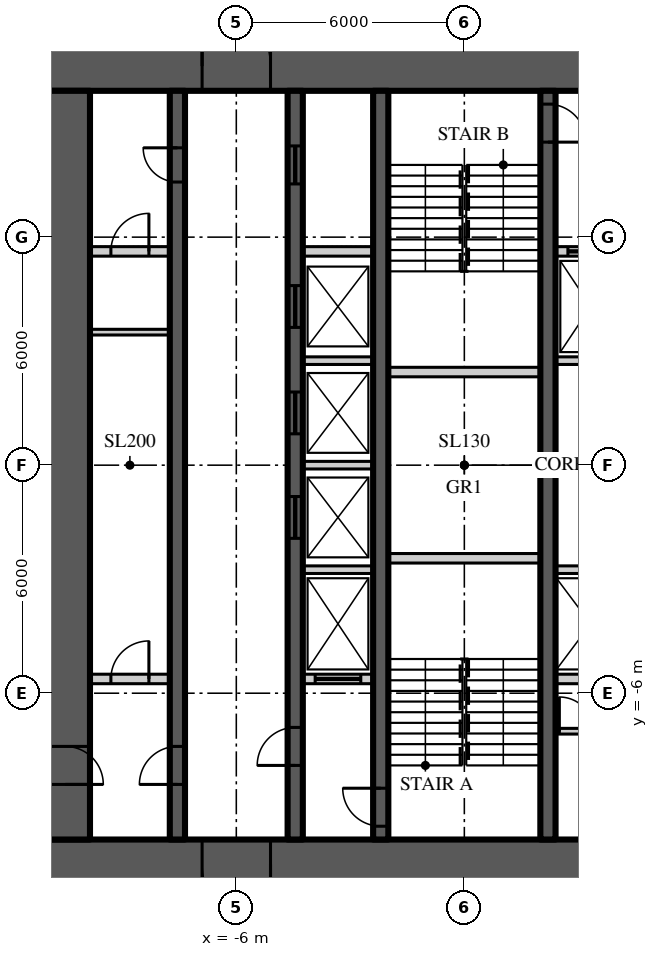
"""IFC4 building model, lengths in metres.
Left out: names, types, materials, properties, quantities, classifications, styles, units other than length and angle.
Written with IfcOpenShell. Run it as: python <this file> out.ifc"""

import sys

from ifc_helpers import new_model, si_unit, direction, frame, frame_2d, origin, place, context, subcontext, project, spatial, rectangle, extrude, element, fill, save


model = new_model("IFC4")
c1 = context("Model", 3, precision=1e-05, world=origin(), true_north=direction((0.0, 1.0)))
c2 = subcontext(c1, "Body", "Model", "MODEL_VIEW")
j1 = project(units=[si_unit("LENGTHUNIT", "METRE"), si_unit("PLANEANGLEUNIT", "RADIAN")], contexts=[c1])
p1 = place(None, origin())
s1 = spatial("IfcSite", under=j1, at=p1, CompositionType="ELEMENT")
p2 = place(p1, origin())
s2 = spatial("IfcBuilding", under=s1, at=p2, CompositionType="ELEMENT")
p3 = place(p2, frame((0.0, 0.0, 174.9)))
s3 = spatial("IfcBuildingStorey", under=s2, at=p3, CompositionType="ELEMENT", Elevation=174.9)
p4 = place(p3, frame((-11.15, 10.5, 0.0), z_axis=(0.0, 0.0, 1.0), x_axis=(1.0, 0.0, 0.0)))
e1 = element("IfcWall", 1, at=p4, inside=s3, PredefinedType="SHEAR", context=c2, shape_type="SweptSolid", body=[
    extrude(rectangle(XDim=22.3, YDim=1.3, at=frame_2d((11.15, 0.0))), origin(), (0.0, 0.0, 1.0), 3.9),
])
p5 = place(p4, frame((4.25, 0.0, 0.0)))
e2 = element("IfcOpeningElement", 2, at=p5, cuts=e1, PredefinedType="OPENING", context=c2, shape_type="SweptSolid", body=[
    extrude(rectangle(XDim=1.8, YDim=2.2, at=frame_2d((0.9, 1.1))), frame((0.0, 0.66, 0.0), z_axis=(0.0, -1.0, 0.0), x_axis=(1.0, 0.0, 0.0)), (0.0, 0.0, 1.0), 1.32),
])
p6 = place(p4, frame((16.25, 0.0, 0.0)))
e3 = element("IfcOpeningElement", 3, at=p6, cuts=e1, PredefinedType="OPENING", context=c2, shape_type="SweptSolid", body=[
    extrude(rectangle(XDim=1.8, YDim=2.2, at=frame_2d((0.9, 1.1))), frame((0.0, 0.66, 0.0), z_axis=(0.0, -1.0, 0.0), x_axis=(1.0, 0.0, 0.0)), (0.0, 0.0, 1.0), 1.32),
])
p7 = place(p3, frame((11.15, -10.5, 0.0), z_axis=(0.0, 0.0, 1.0), x_axis=(-1.0, 0.0, 0.0)))
e4 = element("IfcWall", 4, at=p7, inside=s3, PredefinedType="SHEAR", context=c2, shape_type="SweptSolid", body=[
    extrude(rectangle(XDim=22.3, YDim=1.3, at=frame_2d((11.15, 0.0))), origin(), (0.0, 0.0, 1.0), 3.9),
])
p8 = place(p7, frame((16.25, 0.0, 0.0)))
e5 = element("IfcOpeningElement", 5, at=p8, cuts=e4, PredefinedType="OPENING", context=c2, shape_type="SweptSolid", body=[
    extrude(rectangle(XDim=1.8, YDim=2.2, at=frame_2d((0.9, 1.1))), frame((0.0, 0.66, 0.0), z_axis=(0.0, -1.0, 0.0), x_axis=(1.0, 0.0, 0.0)), (0.0, 0.0, 1.0), 1.32),
])
p9 = place(p7, frame((4.25, 0.0, 0.0)))
e6 = element("IfcOpeningElement", 6, at=p9, cuts=e4, PredefinedType="OPENING", context=c2, shape_type="SweptSolid", body=[
    extrude(rectangle(XDim=1.8, YDim=2.2, at=frame_2d((0.9, 1.1))), frame((0.0, 0.66, 0.0), z_axis=(0.0, -1.0, 0.0), x_axis=(1.0, 0.0, 0.0)), (0.0, 0.0, 1.0), 1.32),
])
p10 = place(p3, frame((-10.5, 9.85, 0.0), z_axis=(0.0, 0.0, 1.0), x_axis=(0.0, -1.0, 0.0)))
e7 = element("IfcWall", 7, at=p10, inside=s3, PredefinedType="SHEAR", context=c2, shape_type="SweptSolid", body=[
    extrude(rectangle(XDim=19.7, YDim=1.3, at=frame_2d((9.85, 0.0))), origin(), (0.0, 0.0, 1.0), 3.9),
])
p11 = place(p10, frame((17.25, 0.0, 0.0)))
e8 = element("IfcOpeningElement", 8, at=p11, cuts=e7, PredefinedType="OPENING", context=c2, shape_type="SweptSolid", body=[
    extrude(rectangle(XDim=1.0, YDim=2.2, at=frame_2d((0.5, 1.1))), frame((0.0, 0.66, 0.0), z_axis=(0.0, -1.0, 0.0), x_axis=(1.0, 0.0, 0.0)), (0.0, 0.0, 1.0), 1.32),
])
p12 = place(p3, frame((-7.55, -9.85, 0.0), z_axis=(0.0, 0.0, 1.0), x_axis=(0.0, 1.0, 0.0)))
e9 = element("IfcWall", 9, at=p12, inside=s3, PredefinedType="SHEAR", context=c2, shape_type="SweptSolid", body=[
    extrude(rectangle(XDim=19.7, YDim=0.4, at=frame_2d((9.85, 0.0))), origin(), (0.0, 0.0, 1.0), 3.9),
])
p13 = place(p12, frame((1.45, 0.0, 0.0)))
e10 = element("IfcOpeningElement", 10, at=p13, cuts=e9, PredefinedType="OPENING", context=c2, shape_type="SweptSolid", body=[
    extrude(rectangle(XDim=1.0, YDim=2.2, at=frame_2d((0.5, 1.1))), frame((0.0, 0.21, 0.0), z_axis=(0.0, -1.0, 0.0), x_axis=(1.0, 0.0, 0.0)), (0.0, 0.0, 1.0), 0.42),
])
p14 = place(p12, frame((17.3, 0.0, 0.0)))
e11 = element("IfcOpeningElement", 11, at=p14, cuts=e9, PredefinedType="OPENING", context=c2, shape_type="SweptSolid", body=[
    extrude(rectangle(XDim=0.9, YDim=2.1, at=frame_2d((0.45, 1.05))), frame((0.0, 0.21, 0.0), z_axis=(0.0, -1.0, 0.0), x_axis=(1.0, 0.0, 0.0)), (0.0, 0.0, 1.0), 0.42),
])
p15 = place(p3, frame((-4.45, -9.85, 0.0), z_axis=(0.0, 0.0, 1.0), x_axis=(0.0, 1.0, 0.0)))
e12 = element("IfcWall", 12, at=p15, inside=s3, PredefinedType="SHEAR", context=c2, shape_type="SweptSolid", body=[
    extrude(rectangle(XDim=19.7, YDim=0.4, at=frame_2d((9.85, 0.0))), origin(), (0.0, 0.0, 1.0), 3.9),
])
p16 = place(p15, frame((1.95, 0.0, 0.0)))
e13 = element("IfcOpeningElement", 13, at=p16, cuts=e12, PredefinedType="OPENING", context=c2, shape_type="SweptSolid", body=[
    extrude(rectangle(XDim=1.0, YDim=2.2, at=frame_2d((0.5, 1.1))), frame((0.0, 0.21, 0.0), z_axis=(0.0, -1.0, 0.0), x_axis=(1.0, 0.0, 0.0)), (0.0, 0.0, 1.0), 0.42),
])
p17 = place(p15, frame((17.25, 0.0, 0.0)))
e14 = element("IfcOpeningElement", 14, at=p17, cuts=e12, PredefinedType="OPENING", context=c2, shape_type="SweptSolid", body=[
    extrude(rectangle(XDim=1.0, YDim=2.1, at=frame_2d((0.5, 1.05))), frame((0.0, 0.21, 0.0), z_axis=(0.0, -1.0, 0.0), x_axis=(1.0, 0.0, 0.0)), (0.0, 0.0, 1.0), 0.42),
])
p18 = place(p15, frame((7.925, 0.0, 0.0)))
e15 = element("IfcOpeningElement", 15, at=p18, cuts=e12, PredefinedType="OPENING", context=c2, shape_type="SweptSolid", body=[
    extrude(rectangle(XDim=1.1, YDim=2.2, at=frame_2d((0.55, 1.1))), frame((0.0, 0.21, 0.0), z_axis=(0.0, -1.0, 0.0), x_axis=(1.0, 0.0, 0.0)), (0.0, 0.0, 1.0), 0.42),
])
p19 = place(p15, frame((10.675, 0.0, 0.0)))
e16 = element("IfcOpeningElement", 16, at=p19, cuts=e12, PredefinedType="OPENING", context=c2, shape_type="SweptSolid", body=[
    extrude(rectangle(XDim=1.1, YDim=2.2, at=frame_2d((0.55, 1.1))), frame((0.0, 0.21, 0.0), z_axis=(0.0, -1.0, 0.0), x_axis=(1.0, 0.0, 0.0)), (0.0, 0.0, 1.0), 0.42),
])
p20 = place(p15, frame((13.475, 0.0, 0.0)))
e17 = element("IfcOpeningElement", 17, at=p20, cuts=e12, PredefinedType="OPENING", context=c2, shape_type="SweptSolid", body=[
    extrude(rectangle(XDim=1.1, YDim=2.2, at=frame_2d((0.55, 1.1))), frame((0.0, 0.21, 0.0), z_axis=(0.0, -1.0, 0.0), x_axis=(1.0, 0.0, 0.0)), (0.0, 0.0, 1.0), 0.42),
])
p21 = place(p3, frame((-2.2, -9.85, 0.0), z_axis=(0.0, 0.0, 1.0), x_axis=(0.0, 1.0, 0.0)))
e18 = element("IfcWall", 18, at=p21, inside=s3, PredefinedType="SHEAR", context=c2, shape_type="SweptSolid", body=[
    extrude(rectangle(XDim=19.7, YDim=0.4, at=frame_2d((9.85, 0.0))), origin(), (0.0, 0.0, 1.0), 3.9),
])
p22 = place(p21, frame((0.35, 0.0, 0.0)))
e19 = element("IfcOpeningElement", 19, at=p22, cuts=e18, PredefinedType="OPENING", context=c2, shape_type="SweptSolid", body=[
    extrude(rectangle(XDim=1.0, YDim=2.2, at=frame_2d((0.5, 1.1))), frame((0.0, 0.21, 0.0), z_axis=(0.0, -1.0, 0.0), x_axis=(1.0, 0.0, 0.0)), (0.0, 0.0, 1.0), 0.42),
])
p23 = place(p3, frame((2.2, 9.85, 0.0), z_axis=(0.0, 0.0, 1.0), x_axis=(0.0, -1.0, 0.0)))
e20 = element("IfcWall", 20, at=p23, inside=s3, PredefinedType="SHEAR", context=c2, shape_type="SweptSolid", body=[
    extrude(rectangle(XDim=19.7, YDim=0.4, at=frame_2d((9.85, 0.0))), origin(), (0.0, 0.0, 1.0), 3.9),
])
p24 = place(p23, frame((0.35, 0.0, 0.0)))
e21 = element("IfcOpeningElement", 21, at=p24, cuts=e20, PredefinedType="OPENING", context=c2, shape_type="SweptSolid", body=[
    extrude(rectangle(XDim=1.0, YDim=2.2, at=frame_2d((0.5, 1.1))), frame((0.0, 0.21, 0.0), z_axis=(0.0, -1.0, 0.0), x_axis=(1.0, 0.0, 0.0)), (0.0, 0.0, 1.0), 0.42),
])
p25 = place(p3, frame((-9.85, 5.625, 0.0), z_axis=(0.0, 0.0, 1.0), x_axis=(1.0, 0.0, 0.0)))
e22 = element("IfcWall", 22, at=p25, inside=s3, PredefinedType="SOLIDWALL", context=c2, shape_type="SweptSolid", body=[
    extrude(rectangle(XDim=2.1, YDim=0.25, at=frame_2d((1.05, 0.0))), origin(), (0.0, 0.0, 1.0), 3.7),
])
p26 = place(p25, frame((0.55, 0.0, 0.0)))
e23 = element("IfcOpeningElement", 23, at=p26, cuts=e22, PredefinedType="OPENING", context=c2, shape_type="SweptSolid", body=[
    extrude(rectangle(XDim=1.0, YDim=2.2, at=frame_2d((0.5, 1.1))), frame((0.0, 0.135, 0.0), z_axis=(0.0, -1.0, 0.0), x_axis=(1.0, 0.0, 0.0)), (0.0, 0.0, 1.0), 0.27),
])
p27 = place(p3, frame((-4.25, 5.625, 0.0), z_axis=(0.0, 0.0, 1.0), x_axis=(1.0, 0.0, 0.0)))
e24 = element("IfcWall", 24, at=p27, inside=s3, PredefinedType="SOLIDWALL", context=c2, shape_type="SweptSolid", body=[
    extrude(rectangle(XDim=1.85, YDim=0.25, at=frame_2d((0.925, 0.0))), origin(), (0.0, 0.0, 1.0), 3.7),
])
p28 = place(p3, frame((2.4, 5.625, 0.0), z_axis=(0.0, 0.0, 1.0), x_axis=(1.0, 0.0, 0.0)))
e25 = element("IfcWall", 25, at=p28, inside=s3, PredefinedType="SOLIDWALL", context=c2, shape_type="SweptSolid", body=[
    extrude(rectangle(XDim=1.85, YDim=0.25, at=frame_2d((0.925, 0.0))), origin(), (0.0, 0.0, 1.0), 3.7),
])
p29 = place(p28, frame((0.325, 0.0, 0.0)))
e26 = element("IfcOpeningElement", 26, at=p29, cuts=e25, PredefinedType="OPENING", context=c2, shape_type="SweptSolid", body=[
    extrude(rectangle(XDim=1.2, YDim=2.2, at=frame_2d((0.6, 1.1))), frame((0.0, 0.135, 0.0), z_axis=(0.0, -1.0, 0.0), x_axis=(1.0, 0.0, 0.0)), (0.0, 0.0, 1.0), 0.27),
])
p30 = place(p3, frame((-9.85, -5.625, 0.0), z_axis=(0.0, 0.0, 1.0), x_axis=(1.0, 0.0, 0.0)))
e27 = element("IfcWall", 27, at=p30, inside=s3, PredefinedType="SOLIDWALL", context=c2, shape_type="SweptSolid", body=[
    extrude(rectangle(XDim=2.1, YDim=0.25, at=frame_2d((1.05, 0.0))), origin(), (0.0, 0.0, 1.0), 3.7),
])
p31 = place(p30, frame((0.55, 0.0, 0.0)))
e28 = element("IfcOpeningElement", 28, at=p31, cuts=e27, PredefinedType="OPENING", context=c2, shape_type="SweptSolid", body=[
    extrude(rectangle(XDim=1.0, YDim=2.2, at=frame_2d((0.5, 1.1))), frame((0.0, 0.135, 0.0), z_axis=(0.0, -1.0, 0.0), x_axis=(1.0, 0.0, 0.0)), (0.0, 0.0, 1.0), 0.27),
])
p32 = place(p3, frame((-4.25, -5.625, 0.0), z_axis=(0.0, 0.0, 1.0), x_axis=(1.0, 0.0, 0.0)))
e29 = element("IfcWall", 29, at=p32, inside=s3, PredefinedType="SOLIDWALL", context=c2, shape_type="SweptSolid", body=[
    extrude(rectangle(XDim=1.85, YDim=0.25, at=frame_2d((0.925, 0.0))), origin(), (0.0, 0.0, 1.0), 3.7),
])
p33 = place(p32, frame((0.325, 0.0, 0.0)))
e30 = element("IfcOpeningElement", 30, at=p33, cuts=e29, PredefinedType="OPENING", context=c2, shape_type="SweptSolid", body=[
    extrude(rectangle(XDim=1.2, YDim=2.2, at=frame_2d((0.6, 1.1))), frame((0.0, 0.135, 0.0), z_axis=(0.0, -1.0, 0.0), x_axis=(1.0, 0.0, 0.0)), (0.0, 0.0, 1.0), 0.27),
])
p34 = place(p3, frame((2.4, -5.625, 0.0), z_axis=(0.0, 0.0, 1.0), x_axis=(1.0, 0.0, 0.0)))
e31 = element("IfcWall", 31, at=p34, inside=s3, PredefinedType="SOLIDWALL", context=c2, shape_type="SweptSolid", body=[
    extrude(rectangle(XDim=1.85, YDim=0.25, at=frame_2d((0.925, 0.0))), origin(), (0.0, 0.0, 1.0), 3.7),
])
for number, where, z_axis, x_axis in (
    (32, (-2.0, -2.45, 0.0), (0.0, 0.0, 1.0), (1.0, 0.0, 0.0)),
    (33, (-2.0, 2.45, 0.0), (0.0, 0.0, 1.0), (1.0, 0.0, 0.0)),
):
    element("IfcWall", number, at=place(p3, frame(where, z_axis=z_axis, x_axis=x_axis)), inside=s3, PredefinedType="SOLIDWALL", context=c2, shape_type="SweptSolid", body=[
        extrude(rectangle(XDim=4.0, YDim=0.25, at=frame_2d((2.0, 0.0))), origin(), (0.0, 0.0, 1.0), 3.7),
    ])
for number, where, z_axis, x_axis in (
    (34, (-4.25, -2.75, 0.0), (0.0, 0.0, 1.0), (1.0, 0.0, 0.0)),
    (35, (2.4, -2.75, 0.0), (0.0, 0.0, 1.0), (1.0, 0.0, 0.0)),
    (36, (-4.25, 0.0, 0.0), (0.0, 0.0, 1.0), (1.0, 0.0, 0.0)),
    (37, (-4.25, 2.75, 0.0), (0.0, 0.0, 1.0), (1.0, 0.0, 0.0)),
    (38, (2.4, 2.75, 0.0), (0.0, 0.0, 1.0), (1.0, 0.0, 0.0)),
):
    element("IfcWall", number, at=place(p3, frame(where, z_axis=z_axis, x_axis=x_axis)), inside=s3, PredefinedType="SOLIDWALL", context=c2, shape_type="SweptSolid", body=[
        extrude(rectangle(XDim=1.85, YDim=0.2, at=frame_2d((0.925, 0.0))), origin(), (0.0, 0.0, 1.0), 3.7),
    ])
p35 = place(p3, frame((-9.85, 3.5, 0.0), z_axis=(0.0, 0.0, 1.0), x_axis=(1.0, 0.0, 0.0)))
e39 = element("IfcWall", 39, at=p35, inside=s3, PredefinedType="SOLIDWALL", context=c2, shape_type="SweptSolid", body=[
    extrude(rectangle(XDim=2.1, YDim=0.15, at=frame_2d((1.05, 0.0))), origin(), (0.0, 0.0, 1.0), 3.77),
])
p36 = place(p3, frame((2.4, -7.0, 0.0), z_axis=(0.0, 0.0, 1.0), x_axis=(1.0, 0.0, 0.0)))
e40 = element("IfcWall", 40, at=p36, inside=s3, PredefinedType="SOLIDWALL", context=c2, shape_type="SweptSolid", body=[
    extrude(rectangle(XDim=1.85, YDim=0.15, at=frame_2d((0.925, 0.0))), origin(), (0.0, 0.0, 1.0), 3.77),
])
p37 = place(p36, frame((0.1, 0.0, 0.0)))
e41 = element("IfcOpeningElement", 41, at=p37, cuts=e40, PredefinedType="OPENING", context=c2, shape_type="SweptSolid", body=[
    extrude(rectangle(XDim=0.9, YDim=2.1, at=frame_2d((0.45, 1.05))), frame((0.0, 0.085, 0.0), z_axis=(0.0, -1.0, 0.0), x_axis=(1.0, 0.0, 0.0)), (0.0, 0.0, 1.0), 0.17),
])
p38 = place(p5, origin())
e42 = element("IfcDoor", 42, at=p38, inside=s3, OperationType="DOUBLE_DOOR_DOUBLE_SWING", PredefinedType="DOOR", context=c2, shape_type="SweptSolid", body=[
    extrude(rectangle(XDim=1.8, YDim=2.2, at=frame_2d((0.9, 1.1))), frame((0.0, 0.025, 0.0), z_axis=(0.0, -1.0, 0.0), x_axis=(1.0, 0.0, 0.0)), (0.0, 0.0, 1.0), 0.05),
])
fill(e2, e42)
p39 = place(p8, origin())
e43 = element("IfcDoor", 43, at=p39, inside=s3, OperationType="DOUBLE_DOOR_DOUBLE_SWING", PredefinedType="DOOR", context=c2, shape_type="SweptSolid", body=[
    extrude(rectangle(XDim=1.8, YDim=2.2, at=frame_2d((0.9, 1.1))), frame((0.0, 0.025, 0.0), z_axis=(0.0, -1.0, 0.0), x_axis=(1.0, 0.0, 0.0)), (0.0, 0.0, 1.0), 0.05),
])
fill(e5, e43)
p40 = place(p13, origin())
e44 = element("IfcDoor", 44, at=p40, inside=s3, OperationType="SINGLE_SWING_LEFT", PredefinedType="DOOR", context=c2, shape_type="SweptSolid", body=[
    extrude(rectangle(XDim=1.0, YDim=2.2, at=frame_2d((0.5, 1.1))), frame((0.0, 0.025, 0.0), z_axis=(0.0, -1.0, 0.0), x_axis=(1.0, 0.0, 0.0)), (0.0, 0.0, 1.0), 0.05),
])
fill(e10, e44)
p41 = place(p11, origin())
e45 = element("IfcDoor", 45, at=p41, inside=s3, OperationType="SINGLE_SWING_RIGHT", PredefinedType="DOOR", context=c2, shape_type="SweptSolid", body=[
    extrude(rectangle(XDim=1.0, YDim=2.2, at=frame_2d((0.5, 1.1))), frame((0.0, 0.025, 0.0), z_axis=(0.0, -1.0, 0.0), x_axis=(1.0, 0.0, 0.0)), (0.0, 0.0, 1.0), 0.05),
])
fill(e8, e45)
p42 = place(p16, origin())
e46 = element("IfcDoor", 46, at=p42, inside=s3, OperationType="SINGLE_SWING_LEFT", PredefinedType="DOOR", context=c2, shape_type="SweptSolid", body=[
    extrude(rectangle(XDim=1.0, YDim=2.2, at=frame_2d((0.5, 1.1))), frame((0.0, 0.025, 0.0), z_axis=(0.0, -1.0, 0.0), x_axis=(1.0, 0.0, 0.0)), (0.0, 0.0, 1.0), 0.05),
])
fill(e13, e46)
p43 = place(p22, origin())
e47 = element("IfcDoor", 47, at=p43, inside=s3, OperationType="SINGLE_SWING_RIGHT", PredefinedType="DOOR", context=c2, shape_type="SweptSolid", body=[
    extrude(rectangle(XDim=1.0, YDim=2.2, at=frame_2d((0.5, 1.1))), frame((0.0, 0.025, 0.0), z_axis=(0.0, -1.0, 0.0), x_axis=(1.0, 0.0, 0.0)), (0.0, 0.0, 1.0), 0.05),
])
fill(e19, e47)
p44 = place(p24, origin())
e48 = element("IfcDoor", 48, at=p44, inside=s3, OperationType="SINGLE_SWING_RIGHT", PredefinedType="DOOR", context=c2, shape_type="SweptSolid", body=[
    extrude(rectangle(XDim=1.0, YDim=2.2, at=frame_2d((0.5, 1.1))), frame((0.0, 0.025, 0.0), z_axis=(0.0, -1.0, 0.0), x_axis=(1.0, 0.0, 0.0)), (0.0, 0.0, 1.0), 0.05),
])
fill(e21, e48)
p45 = place(p14, origin())
e49 = element("IfcDoor", 49, at=p45, inside=s3, OperationType="SINGLE_SWING_RIGHT", PredefinedType="DOOR", context=c2, shape_type="SweptSolid", body=[
    extrude(rectangle(XDim=0.9, YDim=2.1, at=frame_2d((0.45, 1.05))), frame((0.0, 0.025, 0.0), z_axis=(0.0, -1.0, 0.0), x_axis=(1.0, 0.0, 0.0)), (0.0, 0.0, 1.0), 0.05),
])
fill(e11, e49)
p46 = place(p17, origin())
e50 = element("IfcDoor", 50, at=p46, inside=s3, OperationType="SLIDING_TO_LEFT", PredefinedType="DOOR", context=c2, shape_type="SweptSolid", body=[
    extrude(rectangle(XDim=1.0, YDim=2.1, at=frame_2d((0.5, 1.05))), frame((0.0, 0.025, 0.0), z_axis=(0.0, -1.0, 0.0), x_axis=(1.0, 0.0, 0.0)), (0.0, 0.0, 1.0), 0.05),
])
fill(e14, e50)
p47 = place(p18, origin())
e51 = element("IfcDoor", 51, at=p47, inside=s3, OperationType="SLIDING_TO_LEFT", PredefinedType="DOOR", context=c2, shape_type="SweptSolid", body=[
    extrude(rectangle(XDim=1.1, YDim=2.2, at=frame_2d((0.55, 1.1))), frame((0.0, 0.025, 0.0), z_axis=(0.0, -1.0, 0.0), x_axis=(1.0, 0.0, 0.0)), (0.0, 0.0, 1.0), 0.05),
])
fill(e15, e51)
p48 = place(p19, origin())
e52 = element("IfcDoor", 52, at=p48, inside=s3, OperationType="SLIDING_TO_LEFT", PredefinedType="DOOR", context=c2, shape_type="SweptSolid", body=[
    extrude(rectangle(XDim=1.1, YDim=2.2, at=frame_2d((0.55, 1.1))), frame((0.0, 0.025, 0.0), z_axis=(0.0, -1.0, 0.0), x_axis=(1.0, 0.0, 0.0)), (0.0, 0.0, 1.0), 0.05),
])
fill(e16, e52)
p49 = place(p20, origin())
e53 = element("IfcDoor", 53, at=p49, inside=s3, OperationType="SLIDING_TO_LEFT", PredefinedType="DOOR", context=c2, shape_type="SweptSolid", body=[
    extrude(rectangle(XDim=1.1, YDim=2.2, at=frame_2d((0.55, 1.1))), frame((0.0, 0.025, 0.0), z_axis=(0.0, -1.0, 0.0), x_axis=(1.0, 0.0, 0.0)), (0.0, 0.0, 1.0), 0.05),
])
fill(e17, e53)
p50 = place(p33, origin())
e54 = element("IfcDoor", 54, at=p50, inside=s3, OperationType="SLIDING_TO_LEFT", PredefinedType="DOOR", context=c2, shape_type="SweptSolid", body=[
    extrude(rectangle(XDim=1.2, YDim=2.2, at=frame_2d((0.6, 1.1))), frame((0.0, 0.025, 0.0), z_axis=(0.0, -1.0, 0.0), x_axis=(1.0, 0.0, 0.0)), (0.0, 0.0, 1.0), 0.05),
])
fill(e30, e54)
p51 = place(p29, origin())
e55 = element("IfcDoor", 55, at=p51, inside=s3, OperationType="SLIDING_TO_LEFT", PredefinedType="DOOR", context=c2, shape_type="SweptSolid", body=[
    extrude(rectangle(XDim=1.2, YDim=2.2, at=frame_2d((0.6, 1.1))), frame((0.0, 0.025, 0.0), z_axis=(0.0, -1.0, 0.0), x_axis=(1.0, 0.0, 0.0)), (0.0, 0.0, 1.0), 0.05),
])
fill(e26, e55)
p52 = place(p26, origin())
e56 = element("IfcDoor", 56, at=p52, inside=s3, OperationType="SINGLE_SWING_RIGHT", PredefinedType="DOOR", context=c2, shape_type="SweptSolid", body=[
    extrude(rectangle(XDim=1.0, YDim=2.2, at=frame_2d((0.5, 1.1))), frame((0.0, 0.025, 0.0), z_axis=(0.0, -1.0, 0.0), x_axis=(1.0, 0.0, 0.0)), (0.0, 0.0, 1.0), 0.05),
])
fill(e23, e56)
p53 = place(p31, origin())
e57 = element("IfcDoor", 57, at=p53, inside=s3, OperationType="SINGLE_SWING_RIGHT", PredefinedType="DOOR", context=c2, shape_type="SweptSolid", body=[
    extrude(rectangle(XDim=1.0, YDim=2.2, at=frame_2d((0.5, 1.1))), frame((0.0, 0.025, 0.0), z_axis=(0.0, -1.0, 0.0), x_axis=(1.0, 0.0, 0.0)), (0.0, 0.0, 1.0), 0.05),
])
fill(e28, e57)
p54 = place(p37, origin())
e58 = element("IfcDoor", 58, at=p54, inside=s3, OperationType="SINGLE_SWING_LEFT", PredefinedType="DOOR", context=c2, shape_type="SweptSolid", body=[
    extrude(rectangle(XDim=0.9, YDim=2.1, at=frame_2d((0.45, 1.05))), frame((0.0, 0.025, 0.0), z_axis=(0.0, -1.0, 0.0), x_axis=(1.0, 0.0, 0.0)), (0.0, 0.0, 1.0), 0.05),
])
fill(e41, e58)
save(model, sys.argv[1])
